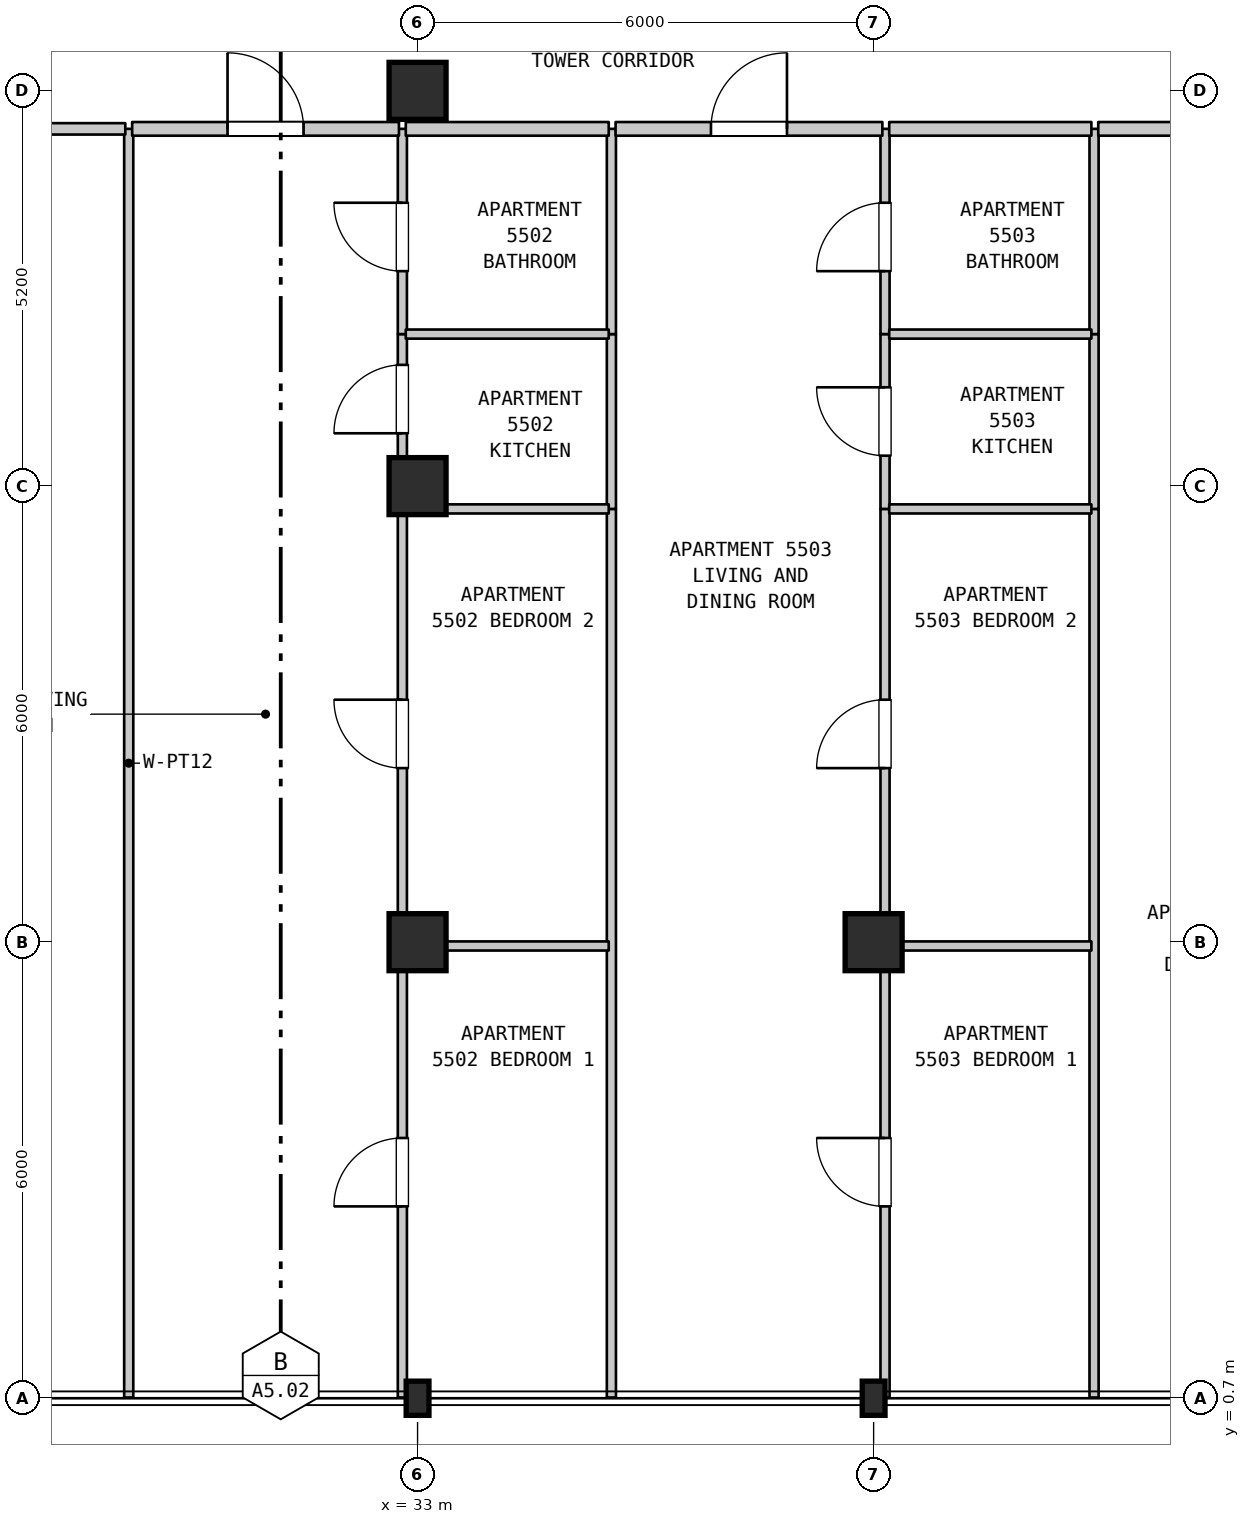
"""IFC4 building model, lengths in metres.
Left out: names, types, materials, properties, quantities, classifications, styles, units other than length and angle.
Written with IfcOpenShell. Run it as: python <this file> out.ifc"""

import sys

from ifc_helpers import new_model, si_unit, direction, frame, frame_2d, origin, origin_2d, place, context, subcontext, project, spatial, rectangle, i_section, extrude, element, fill, save


model = new_model("IFC4")
c1 = context("Model", 3, precision=1e-05, world=origin(), true_north=direction((0.0, 1.0)))
c2 = subcontext(c1, "Body", "Model", "MODEL_VIEW")
j1 = project(units=[si_unit("LENGTHUNIT", "METRE"), si_unit("PLANEANGLEUNIT", "RADIAN")], contexts=[c1])
p1 = place(None, origin())
s1 = spatial("IfcSite", under=j1, at=p1, CompositionType="ELEMENT")
p2 = place(p1, origin())
s2 = spatial("IfcBuilding", under=s1, at=p2, CompositionType="ELEMENT")
p3 = place(p2, frame((0.0, 0.0, 222.8)))
s3 = spatial("IfcBuildingStorey", under=s2, at=p3, CompositionType="ELEMENT", Elevation=222.8)
p4 = place(p3, frame((33.0, 0.7, 0.0), z_axis=(0.0, 0.0, 1.0), x_axis=(1.0, 0.0, 0.0)))
e1 = element("IfcColumn", 1, at=p4, inside=s3, PredefinedType="COLUMN", context=c2, shape_type="SweptSolid", body=[
    extrude(i_section(OverallWidth=0.3, OverallDepth=0.45, WebThickness=0.014, FlangeThickness=0.026, FilletRadius=0.027, at=origin_2d()), origin(), (0.0, 0.0, 1.0), 3.7),
])
for number, where, z_axis, x_axis in (
    (2, (33.0, 6.7, 0.0), (0.0, 0.0, 1.0), (1.0, 0.0, 0.0)),
    (3, (33.0, 12.7, 0.0), (0.0, 0.0, 1.0), (1.0, 0.0, 0.0)),
    (4, (33.0, 17.9, 0.0), (0.0, 0.0, 1.0), (1.0, 0.0, 0.0)),
):
    element("IfcColumn", number, at=place(p3, frame(where, z_axis=z_axis, x_axis=x_axis)), inside=s3, PredefinedType="COLUMN", context=c2, shape_type="SweptSolid", body=[
        extrude(rectangle(XDim=0.75, YDim=0.75, at=origin_2d()), origin(), (0.0, 0.0, 1.0), 3.7),
    ])
p5 = place(p3, frame((39.0, 0.7, 0.0), z_axis=(0.0, 0.0, 1.0), x_axis=(1.0, 0.0, 0.0)))
e5 = element("IfcColumn", 5, at=p5, inside=s3, PredefinedType="COLUMN", context=c2, shape_type="SweptSolid", body=[
    extrude(i_section(OverallWidth=0.3, OverallDepth=0.45, WebThickness=0.014, FlangeThickness=0.026, FilletRadius=0.027, at=origin_2d()), origin(), (0.0, 0.0, 1.0), 3.7),
])
p6 = place(p3, frame((39.0, 6.7, 0.0), z_axis=(0.0, 0.0, 1.0), x_axis=(1.0, 0.0, 0.0)))
e6 = element("IfcColumn", 6, at=p6, inside=s3, PredefinedType="COLUMN", context=c2, shape_type="SweptSolid", body=[
    extrude(rectangle(XDim=0.75, YDim=0.75, at=origin_2d()), origin(), (0.0, 0.0, 1.0), 3.7),
])
p7 = place(p3, frame((29.2, 0.71, 0.0), z_axis=(0.0, 0.0, 1.0), x_axis=(0.0, 1.0, 0.0)))
e7 = element("IfcWall", 7, at=p7, inside=s3, PredefinedType="PARTITIONING", context=c2, shape_type="SweptSolid", body=[
    extrude(rectangle(XDim=16.69, YDim=0.12, at=frame_2d((8.345, 0.0))), origin(), (0.0, 0.0, 1.0), 3.39),
])
p8 = place(p3, frame((32.8, 0.71, 0.0), z_axis=(0.0, 0.0, 1.0), x_axis=(0.0, 1.0, 0.0)))
e8 = element("IfcWall", 8, at=p8, inside=s3, PredefinedType="PARTITIONING", context=c2, shape_type="SweptSolid", body=[
    extrude(rectangle(XDim=11.69, YDim=0.12, at=frame_2d((5.845, 0.0))), origin(), (0.0, 0.0, 1.0), 3.39),
])
p9 = place(p8, frame((2.514, 0.0, 0.0)))
e9 = element("IfcOpeningElement", 9, at=p9, cuts=e8, PredefinedType="OPENING", context=c2, shape_type="SweptSolid", body=[
    extrude(rectangle(XDim=0.9, YDim=2.15, at=frame_2d((0.45, 1.075))), frame((0.0, 0.07, 0.0), z_axis=(0.0, -1.0, 0.0), x_axis=(1.0, 0.0, 0.0)), (0.0, 0.0, 1.0), 0.14),
])
p10 = place(p8, frame((8.28, 0.0, 0.0)))
e10 = element("IfcOpeningElement", 10, at=p10, cuts=e8, PredefinedType="OPENING", context=c2, shape_type="SweptSolid", body=[
    extrude(rectangle(XDim=0.9, YDim=2.15, at=frame_2d((0.45, 1.075))), frame((0.0, 0.07, 0.0), z_axis=(0.0, -1.0, 0.0), x_axis=(1.0, 0.0, 0.0)), (0.0, 0.0, 1.0), 0.14),
])
p11 = place(p3, frame((32.8, 12.4, 0.0), z_axis=(0.0, 0.0, 1.0), x_axis=(0.0, 1.0, 0.0)))
e11 = element("IfcWall", 11, at=p11, inside=s3, PredefinedType="PARTITIONING", context=c2, shape_type="SweptSolid", body=[
    extrude(rectangle(XDim=2.3, YDim=0.12, at=frame_2d((1.15, 0.0))), origin(), (0.0, 0.0, 1.0), 3.39),
])
p12 = place(p11, frame((0.995, 0.0, 0.0)))
e12 = element("IfcOpeningElement", 12, at=p12, cuts=e11, PredefinedType="OPENING", context=c2, shape_type="SweptSolid", body=[
    extrude(rectangle(XDim=0.9, YDim=2.15, at=frame_2d((0.45, 1.075))), frame((0.0, 0.07, 0.0), z_axis=(0.0, -1.0, 0.0), x_axis=(1.0, 0.0, 0.0)), (0.0, 0.0, 1.0), 0.14),
])
p13 = place(p3, frame((32.8, 14.7, 0.0), z_axis=(0.0, 0.0, 1.0), x_axis=(0.0, 1.0, 0.0)))
e13 = element("IfcWall", 13, at=p13, inside=s3, PredefinedType="PARTITIONING", context=c2, shape_type="SweptSolid", body=[
    extrude(rectangle(XDim=2.7, YDim=0.12, at=frame_2d((1.35, 0.0))), origin(), (0.0, 0.0, 1.0), 3.39),
])
p14 = place(p13, frame((0.828, 0.0, 0.0)))
e14 = element("IfcOpeningElement", 14, at=p14, cuts=e13, PredefinedType="OPENING", context=c2, shape_type="SweptSolid", body=[
    extrude(rectangle(XDim=0.9, YDim=2.1, at=frame_2d((0.45, 1.05))), frame((0.0, 0.07, 0.0), z_axis=(0.0, -1.0, 0.0), x_axis=(1.0, 0.0, 0.0)), (0.0, 0.0, 1.0), 0.14),
])
p15 = place(p3, frame((35.55, 0.71, 0.0), z_axis=(0.0, 0.0, 1.0), x_axis=(0.0, 1.0, 0.0)))
e15 = element("IfcWall", 15, at=p15, inside=s3, PredefinedType="PARTITIONING", context=c2, shape_type="SweptSolid", body=[
    extrude(rectangle(XDim=11.69, YDim=0.12, at=frame_2d((5.845, 0.0))), origin(), (0.0, 0.0, 1.0), 3.39),
])
p16 = place(p3, frame((35.55, 12.4, 0.0), z_axis=(0.0, 0.0, 1.0), x_axis=(0.0, 1.0, 0.0)))
e16 = element("IfcWall", 16, at=p16, inside=s3, PredefinedType="PARTITIONING", context=c2, shape_type="SweptSolid", body=[
    extrude(rectangle(XDim=2.3, YDim=0.12, at=frame_2d((1.15, 0.0))), origin(), (0.0, 0.0, 1.0), 3.39),
])
p17 = place(p3, frame((35.55, 14.7, 0.0), z_axis=(0.0, 0.0, 1.0), x_axis=(0.0, 1.0, 0.0)))
e17 = element("IfcWall", 17, at=p17, inside=s3, PredefinedType="PARTITIONING", context=c2, shape_type="SweptSolid", body=[
    extrude(rectangle(XDim=2.7, YDim=0.12, at=frame_2d((1.35, 0.0))), origin(), (0.0, 0.0, 1.0), 3.39),
])
p18 = place(p3, frame((39.15, 0.71, 0.0), z_axis=(0.0, 0.0, 1.0), x_axis=(0.0, 1.0, 0.0)))
e18 = element("IfcWall", 18, at=p18, inside=s3, PredefinedType="PARTITIONING", context=c2, shape_type="SweptSolid", body=[
    extrude(rectangle(XDim=11.69, YDim=0.12, at=frame_2d((5.845, 0.0))), origin(), (0.0, 0.0, 1.0), 3.39),
])
p19 = place(p18, frame((2.514, 0.0, 0.0)))
e19 = element("IfcOpeningElement", 19, at=p19, cuts=e18, PredefinedType="OPENING", context=c2, shape_type="SweptSolid", body=[
    extrude(rectangle(XDim=0.9, YDim=2.15, at=frame_2d((0.45, 1.075))), frame((0.0, 0.07, 0.0), z_axis=(0.0, -1.0, 0.0), x_axis=(1.0, 0.0, 0.0)), (0.0, 0.0, 1.0), 0.14),
])
p20 = place(p18, frame((8.28, 0.0, 0.0)))
e20 = element("IfcOpeningElement", 20, at=p20, cuts=e18, PredefinedType="OPENING", context=c2, shape_type="SweptSolid", body=[
    extrude(rectangle(XDim=0.9, YDim=2.15, at=frame_2d((0.45, 1.075))), frame((0.0, 0.07, 0.0), z_axis=(0.0, -1.0, 0.0), x_axis=(1.0, 0.0, 0.0)), (0.0, 0.0, 1.0), 0.14),
])
p21 = place(p3, frame((39.15, 12.4, 0.0), z_axis=(0.0, 0.0, 1.0), x_axis=(0.0, 1.0, 0.0)))
e21 = element("IfcWall", 21, at=p21, inside=s3, PredefinedType="PARTITIONING", context=c2, shape_type="SweptSolid", body=[
    extrude(rectangle(XDim=2.3, YDim=0.12, at=frame_2d((1.15, 0.0))), origin(), (0.0, 0.0, 1.0), 3.39),
])
p22 = place(p21, frame((0.7, 0.0, 0.0)))
e22 = element("IfcOpeningElement", 22, at=p22, cuts=e21, PredefinedType="OPENING", context=c2, shape_type="SweptSolid", body=[
    extrude(rectangle(XDim=0.9, YDim=2.15, at=frame_2d((0.45, 1.075))), frame((0.0, 0.07, 0.0), z_axis=(0.0, -1.0, 0.0), x_axis=(1.0, 0.0, 0.0)), (0.0, 0.0, 1.0), 0.14),
])
p23 = place(p3, frame((39.15, 14.7, 0.0), z_axis=(0.0, 0.0, 1.0), x_axis=(0.0, 1.0, 0.0)))
e23 = element("IfcWall", 23, at=p23, inside=s3, PredefinedType="PARTITIONING", context=c2, shape_type="SweptSolid", body=[
    extrude(rectangle(XDim=2.7, YDim=0.12, at=frame_2d((1.35, 0.0))), origin(), (0.0, 0.0, 1.0), 3.39),
])
p24 = place(p23, frame((0.828, 0.0, 0.0)))
e24 = element("IfcOpeningElement", 24, at=p24, cuts=e23, PredefinedType="OPENING", context=c2, shape_type="SweptSolid", body=[
    extrude(rectangle(XDim=0.9, YDim=2.1, at=frame_2d((0.45, 1.05))), frame((0.0, 0.07, 0.0), z_axis=(0.0, -1.0, 0.0), x_axis=(1.0, 0.0, 0.0)), (0.0, 0.0, 1.0), 0.14),
])
p25 = place(p3, frame((41.9, 0.71, 0.0), z_axis=(0.0, 0.0, 1.0), x_axis=(0.0, 1.0, 0.0)))
e25 = element("IfcWall", 25, at=p25, inside=s3, PredefinedType="PARTITIONING", context=c2, shape_type="SweptSolid", body=[
    extrude(rectangle(XDim=11.69, YDim=0.12, at=frame_2d((5.845, 0.0))), origin(), (0.0, 0.0, 1.0), 3.39),
])
p26 = place(p3, frame((41.9, 12.4, 0.0), z_axis=(0.0, 0.0, 1.0), x_axis=(0.0, 1.0, 0.0)))
e26 = element("IfcWall", 26, at=p26, inside=s3, PredefinedType="PARTITIONING", context=c2, shape_type="SweptSolid", body=[
    extrude(rectangle(XDim=2.3, YDim=0.12, at=frame_2d((1.15, 0.0))), origin(), (0.0, 0.0, 1.0), 3.39),
])
p27 = place(p3, frame((41.9, 14.7, 0.0), z_axis=(0.0, 0.0, 1.0), x_axis=(0.0, 1.0, 0.0)))
e27 = element("IfcWall", 27, at=p27, inside=s3, PredefinedType="PARTITIONING", context=c2, shape_type="SweptSolid", body=[
    extrude(rectangle(XDim=2.7, YDim=0.12, at=frame_2d((1.35, 0.0))), origin(), (0.0, 0.0, 1.0), 3.39),
])
p28 = place(p3, frame((32.845, 6.65, 0.0), z_axis=(0.0, 0.0, 1.0), x_axis=(1.0, 0.0, 0.0)))
e28 = element("IfcWall", 28, at=p28, inside=s3, PredefinedType="PARTITIONING", context=c2, shape_type="SweptSolid", body=[
    extrude(rectangle(XDim=2.67, YDim=0.12, at=frame_2d((1.335, 0.0))), origin(), (0.0, 0.0, 1.0), 3.09),
])
p29 = place(p3, frame((39.205, 6.65, 0.0), z_axis=(0.0, 0.0, 1.0), x_axis=(1.0, 0.0, 0.0)))
e29 = element("IfcWall", 29, at=p29, inside=s3, PredefinedType="PARTITIONING", context=c2, shape_type="SweptSolid", body=[
    extrude(rectangle(XDim=2.66, YDim=0.12, at=frame_2d((1.33, 0.0))), origin(), (0.0, 0.0, 1.0), 2.79),
])
p30 = place(p3, frame((32.845, 12.4, 0.0), z_axis=(0.0, 0.0, 1.0), x_axis=(1.0, 0.0, 0.0)))
e30 = element("IfcWall", 30, at=p30, inside=s3, PredefinedType="PARTITIONING", context=c2, shape_type="SweptSolid", body=[
    extrude(rectangle(XDim=2.67, YDim=0.12, at=frame_2d((1.335, 0.0))), origin(), (0.0, 0.0, 1.0), 3.39),
])
p31 = place(p3, frame((39.205, 12.4, 0.0), z_axis=(0.0, 0.0, 1.0), x_axis=(1.0, 0.0, 0.0)))
e31 = element("IfcWall", 31, at=p31, inside=s3, PredefinedType="PARTITIONING", context=c2, shape_type="SweptSolid", body=[
    extrude(rectangle(XDim=2.66, YDim=0.12, at=frame_2d((1.33, 0.0))), origin(), (0.0, 0.0, 1.0), 3.39),
])
p32 = place(p3, frame((32.845, 14.7, 0.0), z_axis=(0.0, 0.0, 1.0), x_axis=(1.0, 0.0, 0.0)))
e32 = element("IfcWall", 32, at=p32, inside=s3, PredefinedType="PARTITIONING", context=c2, shape_type="SweptSolid", body=[
    extrude(rectangle(XDim=2.67, YDim=0.12, at=frame_2d((1.335, 0.0))), origin(), (0.0, 0.0, 1.0), 3.39),
])
p33 = place(p3, frame((39.205, 14.7, 0.0), z_axis=(0.0, 0.0, 1.0), x_axis=(1.0, 0.0, 0.0)))
e33 = element("IfcWall", 33, at=p33, inside=s3, PredefinedType="PARTITIONING", context=c2, shape_type="SweptSolid", body=[
    extrude(rectangle(XDim=2.66, YDim=0.12, at=frame_2d((1.33, 0.0))), origin(), (0.0, 0.0, 1.0), 3.39),
])
p34 = place(p3, frame((25.045, 17.4, 0.0), z_axis=(0.0, 0.0, 1.0), x_axis=(1.0, 0.0, 0.0)))
e34 = element("IfcWall", 34, at=p34, inside=s3, PredefinedType="STANDARD", context=c2, shape_type="SweptSolid", body=[
    extrude(rectangle(XDim=4.11, YDim=0.15, at=frame_2d((2.055, 0.0))), origin(), (0.0, 0.0, 1.0), 3.39),
])
p35 = place(p34, frame((1.483, 0.0, 0.0)))
e35 = element("IfcOpeningElement", 35, at=p35, cuts=e34, PredefinedType="OPENING", context=c2, shape_type="SweptSolid", body=[
    extrude(rectangle(XDim=1.0, YDim=2.15, at=frame_2d((0.5, 1.075))), frame((0.0, 0.085, 0.0), z_axis=(0.0, -1.0, 0.0), x_axis=(1.0, 0.0, 0.0)), (0.0, 0.0, 1.0), 0.17),
])
p36 = place(p3, frame((29.245, 17.4, 0.0), z_axis=(0.0, 0.0, 1.0), x_axis=(1.0, 0.0, 0.0)))
e36 = element("IfcWall", 36, at=p36, inside=s3, PredefinedType="STANDARD", context=c2, shape_type="SweptSolid", body=[
    extrude(rectangle(XDim=3.51, YDim=0.18, at=frame_2d((1.755, 0.0))), origin(), (0.0, 0.0, 1.0), 3.39),
])
p37 = place(p36, frame((1.255, 0.0, 0.0)))
e37 = element("IfcOpeningElement", 37, at=p37, cuts=e36, PredefinedType="OPENING", context=c2, shape_type="SweptSolid", body=[
    extrude(rectangle(XDim=1.0, YDim=2.15, at=frame_2d((0.5, 1.075))), frame((0.0, 0.1, 0.0), z_axis=(0.0, -1.0, 0.0), x_axis=(1.0, 0.0, 0.0)), (0.0, 0.0, 1.0), 0.2),
])
p38 = place(p3, frame((32.845, 17.4, 0.0), z_axis=(0.0, 0.0, 1.0), x_axis=(1.0, 0.0, 0.0)))
e38 = element("IfcWall", 38, at=p38, inside=s3, PredefinedType="STANDARD", context=c2, shape_type="SweptSolid", body=[
    extrude(rectangle(XDim=2.67, YDim=0.18, at=frame_2d((1.335, 0.0))), origin(), (0.0, 0.0, 1.0), 3.39),
])
p39 = place(p3, frame((35.605, 17.4, 0.0), z_axis=(0.0, 0.0, 1.0), x_axis=(1.0, 0.0, 0.0)))
e39 = element("IfcWall", 39, at=p39, inside=s3, PredefinedType="STANDARD", context=c2, shape_type="SweptSolid", body=[
    extrude(rectangle(XDim=3.51, YDim=0.18, at=frame_2d((1.755, 0.0))), origin(), (0.0, 0.0, 1.0), 3.39),
])
p40 = place(p39, frame((1.255, 0.0, 0.0)))
e40 = element("IfcOpeningElement", 40, at=p40, cuts=e39, PredefinedType="OPENING", context=c2, shape_type="SweptSolid", body=[
    extrude(rectangle(XDim=1.0, YDim=2.15, at=frame_2d((0.5, 1.075))), frame((0.0, 0.1, 0.0), z_axis=(0.0, -1.0, 0.0), x_axis=(1.0, 0.0, 0.0)), (0.0, 0.0, 1.0), 0.2),
])
p41 = place(p3, frame((39.205, 17.4, 0.0), z_axis=(0.0, 0.0, 1.0), x_axis=(1.0, 0.0, 0.0)))
e41 = element("IfcWall", 41, at=p41, inside=s3, PredefinedType="STANDARD", context=c2, shape_type="SweptSolid", body=[
    extrude(rectangle(XDim=2.66, YDim=0.18, at=frame_2d((1.33, 0.0))), origin(), (0.0, 0.0, 1.0), 3.39),
])
p42 = place(p3, frame((41.955, 17.4, 0.0), z_axis=(0.0, 0.0, 1.0), x_axis=(1.0, 0.0, 0.0)))
e42 = element("IfcWall", 42, at=p42, inside=s3, PredefinedType="STANDARD", context=c2, shape_type="SweptSolid", body=[
    extrude(rectangle(XDim=3.51, YDim=0.18, at=frame_2d((1.755, 0.0))), origin(), (0.0, 0.0, 1.0), 3.39),
])
p43 = place(p42, frame((1.185, 0.0, 0.0)))
e43 = element("IfcOpeningElement", 43, at=p43, cuts=e42, PredefinedType="OPENING", context=c2, shape_type="SweptSolid", body=[
    extrude(rectangle(XDim=1.0, YDim=2.15, at=frame_2d((0.5, 1.075))), frame((0.0, 0.1, 0.0), z_axis=(0.0, -1.0, 0.0), x_axis=(1.0, 0.0, 0.0)), (0.0, 0.0, 1.0), 0.2),
])
p44 = place(p9, origin())
e44 = element("IfcDoor", 44, at=p44, inside=s3, OperationType="SINGLE_SWING_LEFT", PredefinedType="DOOR", context=c2, shape_type="SweptSolid", body=[
    extrude(rectangle(XDim=0.9, YDim=2.15, at=frame_2d((0.45, 1.075))), frame((0.0, 0.025, 0.0), z_axis=(0.0, -1.0, 0.0), x_axis=(1.0, 0.0, 0.0)), (0.0, 0.0, 1.0), 0.05),
])
fill(e9, e44)
p45 = place(p10, origin())
e45 = element("IfcDoor", 45, at=p45, inside=s3, OperationType="SINGLE_SWING_RIGHT", PredefinedType="DOOR", context=c2, shape_type="SweptSolid", body=[
    extrude(rectangle(XDim=0.9, YDim=2.15, at=frame_2d((0.45, 1.075))), frame((0.0, 0.025, 0.0), z_axis=(0.0, -1.0, 0.0), x_axis=(1.0, 0.0, 0.0)), (0.0, 0.0, 1.0), 0.05),
])
fill(e10, e45)
p46 = place(p12, origin())
e46 = element("IfcDoor", 46, at=p46, inside=s3, OperationType="SINGLE_SWING_LEFT", PredefinedType="DOOR", context=c2, shape_type="SweptSolid", body=[
    extrude(rectangle(XDim=0.9, YDim=2.15, at=frame_2d((0.45, 1.075))), frame((0.0, 0.025, 0.0), z_axis=(0.0, -1.0, 0.0), x_axis=(1.0, 0.0, 0.0)), (0.0, 0.0, 1.0), 0.05),
])
fill(e12, e46)
p47 = place(p14, origin())
e47 = element("IfcDoor", 47, at=p47, inside=s3, OperationType="SINGLE_SWING_RIGHT", PredefinedType="DOOR", context=c2, shape_type="SweptSolid", body=[
    extrude(rectangle(XDim=0.9, YDim=2.1, at=frame_2d((0.45, 1.05))), frame((0.0, 0.025, 0.0), z_axis=(0.0, -1.0, 0.0), x_axis=(1.0, 0.0, 0.0)), (0.0, 0.0, 1.0), 0.05),
])
fill(e14, e47)
p48 = place(p19, origin())
e48 = element("IfcDoor", 48, at=p48, inside=s3, OperationType="SINGLE_SWING_RIGHT", PredefinedType="DOOR", context=c2, shape_type="SweptSolid", body=[
    extrude(rectangle(XDim=0.9, YDim=2.15, at=frame_2d((0.45, 1.075))), frame((0.0, 0.025, 0.0), z_axis=(0.0, -1.0, 0.0), x_axis=(1.0, 0.0, 0.0)), (0.0, 0.0, 1.0), 0.05),
])
fill(e19, e48)
p49 = place(p20, origin())
e49 = element("IfcDoor", 49, at=p49, inside=s3, OperationType="SINGLE_SWING_LEFT", PredefinedType="DOOR", context=c2, shape_type="SweptSolid", body=[
    extrude(rectangle(XDim=0.9, YDim=2.15, at=frame_2d((0.45, 1.075))), frame((0.0, 0.025, 0.0), z_axis=(0.0, -1.0, 0.0), x_axis=(1.0, 0.0, 0.0)), (0.0, 0.0, 1.0), 0.05),
])
fill(e20, e49)
p50 = place(p22, origin())
e50 = element("IfcDoor", 50, at=p50, inside=s3, OperationType="SINGLE_SWING_RIGHT", PredefinedType="DOOR", context=c2, shape_type="SweptSolid", body=[
    extrude(rectangle(XDim=0.9, YDim=2.15, at=frame_2d((0.45, 1.075))), frame((0.0, 0.025, 0.0), z_axis=(0.0, -1.0, 0.0), x_axis=(1.0, 0.0, 0.0)), (0.0, 0.0, 1.0), 0.05),
])
fill(e22, e50)
p51 = place(p24, origin())
e51 = element("IfcDoor", 51, at=p51, inside=s3, OperationType="SINGLE_SWING_LEFT", PredefinedType="DOOR", context=c2, shape_type="SweptSolid", body=[
    extrude(rectangle(XDim=0.9, YDim=2.1, at=frame_2d((0.45, 1.05))), frame((0.0, 0.025, 0.0), z_axis=(0.0, -1.0, 0.0), x_axis=(1.0, 0.0, 0.0)), (0.0, 0.0, 1.0), 0.05),
])
fill(e24, e51)
p52 = place(p37, origin())
e52 = element("IfcDoor", 52, at=p52, inside=s3, OperationType="SINGLE_SWING_LEFT", PredefinedType="DOOR", context=c2, shape_type="SweptSolid", body=[
    extrude(rectangle(XDim=1.0, YDim=2.15, at=frame_2d((0.5, 1.075))), frame((0.0, 0.025, 0.0), z_axis=(0.0, -1.0, 0.0), x_axis=(1.0, 0.0, 0.0)), (0.0, 0.0, 1.0), 0.05),
])
fill(e37, e52)
p53 = place(p40, origin())
e53 = element("IfcDoor", 53, at=p53, inside=s3, OperationType="SINGLE_SWING_RIGHT", PredefinedType="DOOR", context=c2, shape_type="SweptSolid", body=[
    extrude(rectangle(XDim=1.0, YDim=2.15, at=frame_2d((0.5, 1.075))), frame((0.0, 0.025, 0.0), z_axis=(0.0, -1.0, 0.0), x_axis=(1.0, 0.0, 0.0)), (0.0, 0.0, 1.0), 0.05),
])
fill(e40, e53)
save(model, sys.argv[1])
